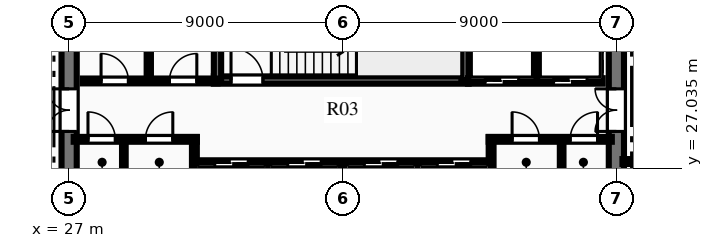
"""IFC4 building model, lengths in metres.
Left out: names, types, materials, properties, quantities, classifications, styles, units other than length and angle.
Written with IfcOpenShell. Run it as: python <this file> out.ifc"""

import sys

from ifc_helpers import new_model, si_unit, direction, frame, frame_2d, origin, place, context, subcontext, project, spatial, rectangle, extrude, element, fill, save


model = new_model("IFC4")
c1 = context("Model", 3, precision=1e-05, world=origin(), true_north=direction((0.0, 1.0)))
c2 = subcontext(c1, "Body", "Model", "MODEL_VIEW")
j1 = project(units=[si_unit("LENGTHUNIT", "METRE"), si_unit("PLANEANGLEUNIT", "RADIAN")], contexts=[c1])
p1 = place(None, origin())
s1 = spatial("IfcSite", under=j1, at=p1, CompositionType="ELEMENT")
p2 = place(p1, origin())
s2 = spatial("IfcBuilding", under=s1, at=p2, CompositionType="ELEMENT")
p3 = place(p2, frame((0.0, 0.0, 205.95)))
s3 = spatial("IfcBuildingStorey", under=s2, at=p3, CompositionType="ELEMENT", Elevation=205.95)
p4 = place(p3, frame((27.0, 18.25, 0.0), z_axis=(0.0, 0.0, 1.0), x_axis=(0.0, 1.0, 0.0)))
e1 = element("IfcWall", 1, at=p4, inside=s3, PredefinedType="SHEAR", context=c2, shape_type="SweptSolid", body=[
    extrude(rectangle(XDim=15.5, YDim=0.5, at=frame_2d((7.75, 0.0))), origin(), (0.0, 0.0, 1.0), 3.75),
])
p5 = place(p4, frame((9.99, 0.0, 0.0)))
e2 = element("IfcOpeningElement", 2, at=p5, cuts=e1, PredefinedType="OPENING", context=c2, shape_type="SweptSolid", body=[
    extrude(rectangle(XDim=1.4, YDim=2.2, at=frame_2d((0.7, 1.1))), frame((0.0, 0.26, 0.0), z_axis=(0.0, -1.0, 0.0), x_axis=(1.0, 0.0, 0.0)), (0.0, 0.0, 1.0), 0.52),
])
p6 = place(p3, frame((45.0, 18.25, 0.0), z_axis=(0.0, 0.0, 1.0), x_axis=(0.0, 1.0, 0.0)))
e3 = element("IfcWall", 3, at=p6, inside=s3, PredefinedType="SHEAR", context=c2, shape_type="SweptSolid", body=[
    extrude(rectangle(XDim=15.5, YDim=0.5, at=frame_2d((7.75, 0.0))), origin(), (0.0, 0.0, 1.0), 3.75),
])
p7 = place(p6, frame((9.99, 0.0, 0.0)))
e4 = element("IfcOpeningElement", 4, at=p7, cuts=e3, PredefinedType="OPENING", context=c2, shape_type="SweptSolid", body=[
    extrude(rectangle(XDim=1.4, YDim=2.2, at=frame_2d((0.7, 1.1))), frame((0.0, 0.26, 0.0), z_axis=(0.0, -1.0, 0.0), x_axis=(1.0, 0.0, 0.0)), (0.0, 0.0, 1.0), 0.52),
])
p8 = place(p3, frame((31.76, 29.93, 0.0), z_axis=(0.0, 0.0, 1.0), x_axis=(1.0, 0.0, 0.0)))
e5 = element("IfcWall", 5, at=p8, inside=s3, PredefinedType="SHEAR", context=c2, shape_type="SweptSolid", body=[
    extrude(rectangle(XDim=8.38, YDim=0.24, at=frame_2d((4.19, 0.0))), origin(), (0.0, 0.0, 1.0), 3.75),
])
p9 = place(p8, frame((0.565, 0.0, 0.0)))
e6 = element("IfcOpeningElement", 6, at=p9, cuts=e5, PredefinedType="OPENING", context=c2, shape_type="SweptSolid", body=[
    extrude(rectangle(XDim=1.05, YDim=2.15, at=frame_2d((0.525, 1.075))), frame((0.0, 0.13, 0.0), z_axis=(0.0, -1.0, 0.0), x_axis=(1.0, 0.0, 0.0)), (0.0, 0.0, 1.0), 0.26),
])
p10 = place(p3, frame((31.88, 29.93, 0.0), z_axis=(0.0, 0.0, 1.0), x_axis=(0.0, 1.0, 0.0)))
e7 = element("IfcWall", 7, at=p10, inside=s3, PredefinedType="SHEAR", context=c2, shape_type="SweptSolid", body=[
    extrude(rectangle(XDim=3.79, YDim=0.24, at=frame_2d((1.895, 0.0))), origin(), (0.0, 0.0, 1.0), 3.75),
])
p11 = place(p3, frame((40.02, 29.93, 0.0), z_axis=(0.0, 0.0, 1.0), x_axis=(0.0, 1.0, 0.0)))
e8 = element("IfcWall", 8, at=p11, inside=s3, PredefinedType="SHEAR", context=c2, shape_type="SweptSolid", body=[
    extrude(rectangle(XDim=3.85, YDim=0.24, at=frame_2d((1.925, 0.0))), origin(), (0.0, 0.0, 1.0), 3.75),
])
p12 = place(p3, frame((27.15, 27.98, 0.0), z_axis=(0.0, 0.0, 1.0), x_axis=(1.0, 0.0, 0.0)))
e9 = element("IfcWall", 9, at=p12, inside=s3, PredefinedType="PARTITIONING", context=c2, shape_type="SweptSolid", body=[
    extrude(rectangle(XDim=4.05, YDim=0.16, at=frame_2d((2.025, 0.0))), origin(), (0.0, 0.0, 1.0), 3.47),
])
p13 = place(p12, frame((0.47, 0.0, 0.0)))
e10 = element("IfcOpeningElement", 10, at=p13, cuts=e9, PredefinedType="OPENING", context=c2, shape_type="SweptSolid", body=[
    extrude(rectangle(XDim=0.9, YDim=2.15, at=frame_2d((0.45, 1.075))), frame((0.0, 0.09, 0.0), z_axis=(0.0, -1.0, 0.0), x_axis=(1.0, 0.0, 0.0)), (0.0, 0.0, 1.0), 0.18),
])
p14 = place(p12, frame((2.36, 0.0, 0.0)))
e11 = element("IfcOpeningElement", 11, at=p14, cuts=e9, PredefinedType="OPENING", context=c2, shape_type="SweptSolid", body=[
    extrude(rectangle(XDim=0.9, YDim=2.15, at=frame_2d((0.45, 1.075))), frame((0.0, 0.09, 0.0), z_axis=(0.0, -1.0, 0.0), x_axis=(1.0, 0.0, 0.0)), (0.0, 0.0, 1.0), 0.18),
])
p15 = place(p3, frame((31.12, 26.54, 0.0), z_axis=(0.0, 0.0, 1.0), x_axis=(0.0, 1.0, 0.0)))
e12 = element("IfcWall", 12, at=p15, inside=s3, PredefinedType="PARTITIONING", context=c2, shape_type="SweptSolid", body=[
    extrude(rectangle(XDim=1.51, YDim=0.16, at=frame_2d((0.755, 0.0))), origin(), (0.0, 0.0, 1.0), 3.47),
])
p16 = place(p3, frame((40.8, 27.98, 0.0), z_axis=(0.0, 0.0, 1.0), x_axis=(1.0, 0.0, 0.0)))
e13 = element("IfcWall", 13, at=p16, inside=s3, PredefinedType="PARTITIONING", context=c2, shape_type="SweptSolid", body=[
    extrude(rectangle(XDim=4.05, YDim=0.16, at=frame_2d((2.025, 0.0))), origin(), (0.0, 0.0, 1.0), 3.47),
])
p17 = place(p16, frame((0.77, 0.0, 0.0)))
e14 = element("IfcOpeningElement", 14, at=p17, cuts=e13, PredefinedType="OPENING", context=c2, shape_type="SweptSolid", body=[
    extrude(rectangle(XDim=0.9, YDim=2.15, at=frame_2d((0.45, 1.075))), frame((0.0, 0.09, 0.0), z_axis=(0.0, -1.0, 0.0), x_axis=(1.0, 0.0, 0.0)), (0.0, 0.0, 1.0), 0.18),
])
p18 = place(p16, frame((2.68, 0.0, 0.0)))
e15 = element("IfcOpeningElement", 15, at=p18, cuts=e13, PredefinedType="OPENING", context=c2, shape_type="SweptSolid", body=[
    extrude(rectangle(XDim=0.9, YDim=2.15, at=frame_2d((0.45, 1.075))), frame((0.0, 0.09, 0.0), z_axis=(0.0, -1.0, 0.0), x_axis=(1.0, 0.0, 0.0)), (0.0, 0.0, 1.0), 0.18),
])
p19 = place(p3, frame((40.88, 26.54, 0.0), z_axis=(0.0, 0.0, 1.0), x_axis=(0.0, 1.0, 0.0)))
e16 = element("IfcWall", 16, at=p19, inside=s3, PredefinedType="PARTITIONING", context=c2, shape_type="SweptSolid", body=[
    extrude(rectangle(XDim=1.51, YDim=0.16, at=frame_2d((0.755, 0.0))), origin(), (0.0, 0.0, 1.0), 3.47),
])
for number, where, z_axis, x_axis in (
    (17, (28.8, 26.54, 0.0), (0.0, 0.0, 1.0), (0.0, 1.0, 0.0)),
    (18, (43.2, 26.54, 0.0), (0.0, 0.0, 1.0), (0.0, 1.0, 0.0)),
):
    element("IfcWall", number, at=place(p3, frame(where, z_axis=z_axis, x_axis=x_axis)), inside=s3, PredefinedType="PARTITIONING", context=c2, shape_type="SweptSolid", body=[
        extrude(rectangle(XDim=1.44, YDim=0.12, at=frame_2d((0.72, 0.0))), origin(), (0.0, 0.0, 1.0), 3.47),
    ])
p20 = place(p3, frame((27.45, 29.9, 0.0), z_axis=(0.0, 0.0, 1.0), x_axis=(1.0, 0.0, 0.0)))
e19 = element("IfcWall", 19, at=p20, inside=s3, PredefinedType="PARTITIONING", context=c2, shape_type="SweptSolid", body=[
    extrude(rectangle(XDim=4.43, YDim=0.16, at=frame_2d((2.215, 0.0))), origin(), (0.0, 0.0, 1.0), 3.47),
])
p21 = place(p20, frame((0.6, 0.0, 0.0)))
e20 = element("IfcOpeningElement", 20, at=p21, cuts=e19, PredefinedType="OPENING", context=c2, shape_type="SweptSolid", body=[
    extrude(rectangle(XDim=0.9, YDim=2.15, at=frame_2d((0.45, 1.075))), frame((0.0, 0.09, 0.0), z_axis=(0.0, -1.0, 0.0), x_axis=(1.0, 0.0, 0.0)), (0.0, 0.0, 1.0), 0.18),
])
p22 = place(p20, frame((2.85, 0.0, 0.0)))
e21 = element("IfcOpeningElement", 21, at=p22, cuts=e19, PredefinedType="OPENING", context=c2, shape_type="SweptSolid", body=[
    extrude(rectangle(XDim=0.9, YDim=2.15, at=frame_2d((0.45, 1.075))), frame((0.0, 0.09, 0.0), z_axis=(0.0, -1.0, 0.0), x_axis=(1.0, 0.0, 0.0)), (0.0, 0.0, 1.0), 0.18),
])
p23 = place(p3, frame((29.62, 29.95, 0.0), z_axis=(0.0, 0.0, 1.0), x_axis=(0.0, 1.0, 0.0)))
e22 = element("IfcWall", 22, at=p23, inside=s3, PredefinedType="PARTITIONING", context=c2, shape_type="SweptSolid", body=[
    extrude(rectangle(XDim=3.6, YDim=0.14, at=frame_2d((1.8, 0.0))), origin(), (0.0, 0.0, 1.0), 3.47),
])
p24 = place(p3, frame((40.12, 29.9, 0.0), z_axis=(0.0, 0.0, 1.0), x_axis=(1.0, 0.0, 0.0)))
e23 = element("IfcWall", 23, at=p24, inside=s3, PredefinedType="PARTITIONING", context=c2, shape_type="SweptSolid", body=[
    extrude(rectangle(XDim=4.43, YDim=0.18, at=frame_2d((2.215, 0.0))), origin(), (0.0, 0.0, 1.0), 3.47),
])
p25 = place(p24, frame((0.565, 0.0, 0.0)))
e24 = element("IfcOpeningElement", 24, at=p25, cuts=e23, PredefinedType="OPENING", context=c2, shape_type="SweptSolid", body=[
    extrude(rectangle(XDim=1.1, YDim=2.15, at=frame_2d((0.55, 1.075))), frame((0.0, 0.1, 0.0), z_axis=(0.0, -1.0, 0.0), x_axis=(1.0, 0.0, 0.0)), (0.0, 0.0, 1.0), 0.2),
])
p26 = place(p24, frame((2.815, 0.0, 0.0)))
e25 = element("IfcOpeningElement", 25, at=p26, cuts=e23, PredefinedType="OPENING", context=c2, shape_type="SweptSolid", body=[
    extrude(rectangle(XDim=1.1, YDim=2.15, at=frame_2d((0.55, 1.075))), frame((0.0, 0.1, 0.0), z_axis=(0.0, -1.0, 0.0), x_axis=(1.0, 0.0, 0.0)), (0.0, 0.0, 1.0), 0.2),
])
p27 = place(p3, frame((42.37, 29.9, 0.0), z_axis=(0.0, 0.0, 1.0), x_axis=(0.0, 1.0, 0.0)))
e26 = element("IfcWall", 26, at=p27, inside=s3, PredefinedType="PARTITIONING", context=c2, shape_type="SweptSolid", body=[
    extrude(rectangle(XDim=3.75, YDim=0.18, at=frame_2d((1.875, 0.0))), origin(), (0.0, 0.0, 1.0), 3.47),
])
p28 = place(p3, frame((31.2, 27.2, 0.0), z_axis=(0.0, 0.0, 1.0), x_axis=(1.0, 0.0, 0.0)))
e27 = element("IfcWall", 27, at=p28, inside=s3, PredefinedType="PARTITIONING", context=c2, shape_type="SweptSolid", body=[
    extrude(rectangle(XDim=9.6, YDim=0.18, at=frame_2d((4.8, 0.0))), origin(), (0.0, 0.0, 1.0), 3.47),
])
p29 = place(p28, frame((0.59, 0.0, 0.0)))
e28 = element("IfcOpeningElement", 28, at=p29, cuts=e27, PredefinedType="OPENING", context=c2, shape_type="SweptSolid", body=[
    extrude(rectangle(XDim=1.1, YDim=2.15, at=frame_2d((0.55, 1.075))), frame((0.0, 0.1, 0.0), z_axis=(0.0, -1.0, 0.0), x_axis=(1.0, 0.0, 0.0)), (0.0, 0.0, 1.0), 0.2),
])
p30 = place(p28, frame((2.99, 0.0, 0.0)))
e29 = element("IfcOpeningElement", 29, at=p30, cuts=e27, PredefinedType="OPENING", context=c2, shape_type="SweptSolid", body=[
    extrude(rectangle(XDim=1.1, YDim=2.15, at=frame_2d((0.55, 1.075))), frame((0.0, 0.1, 0.0), z_axis=(0.0, -1.0, 0.0), x_axis=(1.0, 0.0, 0.0)), (0.0, 0.0, 1.0), 0.2),
])
p31 = place(p28, frame((5.51, 0.0, 0.0)))
e30 = element("IfcOpeningElement", 30, at=p31, cuts=e27, PredefinedType="OPENING", context=c2, shape_type="SweptSolid", body=[
    extrude(rectangle(XDim=1.1, YDim=2.15, at=frame_2d((0.55, 1.075))), frame((0.0, 0.1, 0.0), z_axis=(0.0, -1.0, 0.0), x_axis=(1.0, 0.0, 0.0)), (0.0, 0.0, 1.0), 0.2),
])
p32 = place(p28, frame((7.91, 0.0, 0.0)))
e31 = element("IfcOpeningElement", 31, at=p32, cuts=e27, PredefinedType="OPENING", context=c2, shape_type="SweptSolid", body=[
    extrude(rectangle(XDim=1.1, YDim=2.15, at=frame_2d((0.55, 1.075))), frame((0.0, 0.1, 0.0), z_axis=(0.0, -1.0, 0.0), x_axis=(1.0, 0.0, 0.0)), (0.0, 0.0, 1.0), 0.2),
])
for number, where, z_axis, x_axis in (
    (32, (33.54, 25.3, 0.0), (0.0, 0.0, 1.0), (0.0, 1.0, 0.0)),
    (33, (36.0, 25.3, 0.0), (0.0, 0.0, 1.0), (0.0, 1.0, 0.0)),
    (34, (38.46, 25.3, 0.0), (0.0, 0.0, 1.0), (0.0, 1.0, 0.0)),
):
    element("IfcWall", number, at=place(p3, frame(where, z_axis=z_axis, x_axis=x_axis)), inside=s3, PredefinedType="PARTITIONING", context=c2, shape_type="SweptSolid", body=[
        extrude(rectangle(XDim=1.9, YDim=0.18, at=frame_2d((0.95, 0.0))), origin(), (0.0, 0.0, 1.0), 3.47),
    ])
p33 = place(p3, frame((45.2, 27.25, 0.0), z_axis=(0.0, 0.0, 1.0), x_axis=(1.0, 0.0, 0.0)))
e35 = element("IfcWall", 35, at=p33, inside=s3, PredefinedType="PARTITIONING", context=c2, shape_type="SweptSolid", body=[
    extrude(rectangle(XDim=2.25, YDim=0.16, at=frame_2d((1.125, 0.0))), origin(), (0.0, 0.0, 1.0), 3.47),
])
p34 = place(p13, origin())
e36 = element("IfcDoor", 36, at=p34, inside=s3, OperationType="SINGLE_SWING_LEFT", PredefinedType="DOOR", context=c2, shape_type="SweptSolid", body=[
    extrude(rectangle(XDim=0.9, YDim=2.15, at=frame_2d((0.45, 1.075))), frame((0.0, 0.025, 0.0), z_axis=(0.0, -1.0, 0.0), x_axis=(1.0, 0.0, 0.0)), (0.0, 0.0, 1.0), 0.05),
])
fill(e10, e36)
p35 = place(p14, origin())
e37 = element("IfcDoor", 37, at=p35, inside=s3, OperationType="SINGLE_SWING_RIGHT", PredefinedType="DOOR", context=c2, shape_type="SweptSolid", body=[
    extrude(rectangle(XDim=0.9, YDim=2.15, at=frame_2d((0.45, 1.075))), frame((0.0, 0.025, 0.0), z_axis=(0.0, -1.0, 0.0), x_axis=(1.0, 0.0, 0.0)), (0.0, 0.0, 1.0), 0.05),
])
fill(e11, e37)
p36 = place(p17, origin())
e38 = element("IfcDoor", 38, at=p36, inside=s3, OperationType="SINGLE_SWING_LEFT", PredefinedType="DOOR", context=c2, shape_type="SweptSolid", body=[
    extrude(rectangle(XDim=0.9, YDim=2.15, at=frame_2d((0.45, 1.075))), frame((0.0, 0.025, 0.0), z_axis=(0.0, -1.0, 0.0), x_axis=(1.0, 0.0, 0.0)), (0.0, 0.0, 1.0), 0.05),
])
fill(e14, e38)
p37 = place(p18, origin())
e39 = element("IfcDoor", 39, at=p37, inside=s3, OperationType="SINGLE_SWING_RIGHT", PredefinedType="DOOR", context=c2, shape_type="SweptSolid", body=[
    extrude(rectangle(XDim=0.9, YDim=2.15, at=frame_2d((0.45, 1.075))), frame((0.0, 0.025, 0.0), z_axis=(0.0, -1.0, 0.0), x_axis=(1.0, 0.0, 0.0)), (0.0, 0.0, 1.0), 0.05),
])
fill(e15, e39)
p38 = place(p21, origin())
e40 = element("IfcDoor", 40, at=p38, inside=s3, OperationType="SINGLE_SWING_LEFT", PredefinedType="DOOR", context=c2, shape_type="SweptSolid", body=[
    extrude(rectangle(XDim=0.9, YDim=2.15, at=frame_2d((0.45, 1.075))), frame((0.0, 0.025, 0.0), z_axis=(0.0, -1.0, 0.0), x_axis=(1.0, 0.0, 0.0)), (0.0, 0.0, 1.0), 0.05),
])
fill(e20, e40)
p39 = place(p22, origin())
e41 = element("IfcDoor", 41, at=p39, inside=s3, OperationType="SINGLE_SWING_RIGHT", PredefinedType="DOOR", context=c2, shape_type="SweptSolid", body=[
    extrude(rectangle(XDim=0.9, YDim=2.15, at=frame_2d((0.45, 1.075))), frame((0.0, 0.025, 0.0), z_axis=(0.0, -1.0, 0.0), x_axis=(1.0, 0.0, 0.0)), (0.0, 0.0, 1.0), 0.05),
])
fill(e21, e41)
p40 = place(p9, origin())
e42 = element("IfcDoor", 42, at=p40, inside=s3, OperationType="SINGLE_SWING_LEFT", PredefinedType="DOOR", context=c2, shape_type="SweptSolid", body=[
    extrude(rectangle(XDim=1.05, YDim=2.15, at=frame_2d((0.525, 1.075))), frame((0.0, 0.025, 0.0), z_axis=(0.0, -1.0, 0.0), x_axis=(1.0, 0.0, 0.0)), (0.0, 0.0, 1.0), 0.05),
])
fill(e6, e42)
p41 = place(p5, origin())
e43 = element("IfcDoor", 43, at=p41, inside=s3, OperationType="DOUBLE_DOOR_SINGLE_SWING", PredefinedType="DOOR", context=c2, shape_type="SweptSolid", body=[
    extrude(rectangle(XDim=1.4, YDim=2.2, at=frame_2d((0.7, 1.1))), frame((0.0, 0.025, 0.0), z_axis=(0.0, -1.0, 0.0), x_axis=(1.0, 0.0, 0.0)), (0.0, 0.0, 1.0), 0.05),
])
fill(e2, e43)
p42 = place(p7, origin())
e44 = element("IfcDoor", 44, at=p42, inside=s3, OperationType="DOUBLE_DOOR_SINGLE_SWING", PredefinedType="DOOR", context=c2, shape_type="SweptSolid", body=[
    extrude(rectangle(XDim=1.4, YDim=2.2, at=frame_2d((0.7, 1.1))), frame((0.0, 0.025, 0.0), z_axis=(0.0, -1.0, 0.0), x_axis=(1.0, 0.0, 0.0)), (0.0, 0.0, 1.0), 0.05),
])
fill(e4, e44)
p43 = place(p25, origin())
e45 = element("IfcDoor", 45, at=p43, inside=s3, OperationType="SLIDING_TO_LEFT", PredefinedType="DOOR", context=c2, shape_type="SweptSolid", body=[
    extrude(rectangle(XDim=1.1, YDim=2.15, at=frame_2d((0.55, 1.075))), frame((0.0, 0.025, 0.0), z_axis=(0.0, -1.0, 0.0), x_axis=(1.0, 0.0, 0.0)), (0.0, 0.0, 1.0), 0.05),
])
fill(e24, e45)
p44 = place(p26, origin())
e46 = element("IfcDoor", 46, at=p44, inside=s3, OperationType="SLIDING_TO_LEFT", PredefinedType="DOOR", context=c2, shape_type="SweptSolid", body=[
    extrude(rectangle(XDim=1.1, YDim=2.15, at=frame_2d((0.55, 1.075))), frame((0.0, 0.025, 0.0), z_axis=(0.0, -1.0, 0.0), x_axis=(1.0, 0.0, 0.0)), (0.0, 0.0, 1.0), 0.05),
])
fill(e25, e46)
p45 = place(p29, origin())
e47 = element("IfcDoor", 47, at=p45, inside=s3, OperationType="SLIDING_TO_LEFT", PredefinedType="DOOR", context=c2, shape_type="SweptSolid", body=[
    extrude(rectangle(XDim=1.1, YDim=2.15, at=frame_2d((0.55, 1.075))), frame((0.0, 0.025, 0.0), z_axis=(0.0, -1.0, 0.0), x_axis=(1.0, 0.0, 0.0)), (0.0, 0.0, 1.0), 0.05),
])
fill(e28, e47)
p46 = place(p30, origin())
e48 = element("IfcDoor", 48, at=p46, inside=s3, OperationType="SLIDING_TO_LEFT", PredefinedType="DOOR", context=c2, shape_type="SweptSolid", body=[
    extrude(rectangle(XDim=1.1, YDim=2.15, at=frame_2d((0.55, 1.075))), frame((0.0, 0.025, 0.0), z_axis=(0.0, -1.0, 0.0), x_axis=(1.0, 0.0, 0.0)), (0.0, 0.0, 1.0), 0.05),
])
fill(e29, e48)
p47 = place(p31, origin())
e49 = element("IfcDoor", 49, at=p47, inside=s3, OperationType="SLIDING_TO_LEFT", PredefinedType="DOOR", context=c2, shape_type="SweptSolid", body=[
    extrude(rectangle(XDim=1.1, YDim=2.15, at=frame_2d((0.55, 1.075))), frame((0.0, 0.025, 0.0), z_axis=(0.0, -1.0, 0.0), x_axis=(1.0, 0.0, 0.0)), (0.0, 0.0, 1.0), 0.05),
])
fill(e30, e49)
p48 = place(p32, origin())
e50 = element("IfcDoor", 50, at=p48, inside=s3, OperationType="SLIDING_TO_LEFT", PredefinedType="DOOR", context=c2, shape_type="SweptSolid", body=[
    extrude(rectangle(XDim=1.1, YDim=2.15, at=frame_2d((0.55, 1.075))), frame((0.0, 0.025, 0.0), z_axis=(0.0, -1.0, 0.0), x_axis=(1.0, 0.0, 0.0)), (0.0, 0.0, 1.0), 0.05),
])
fill(e31, e50)
save(model, sys.argv[1])
